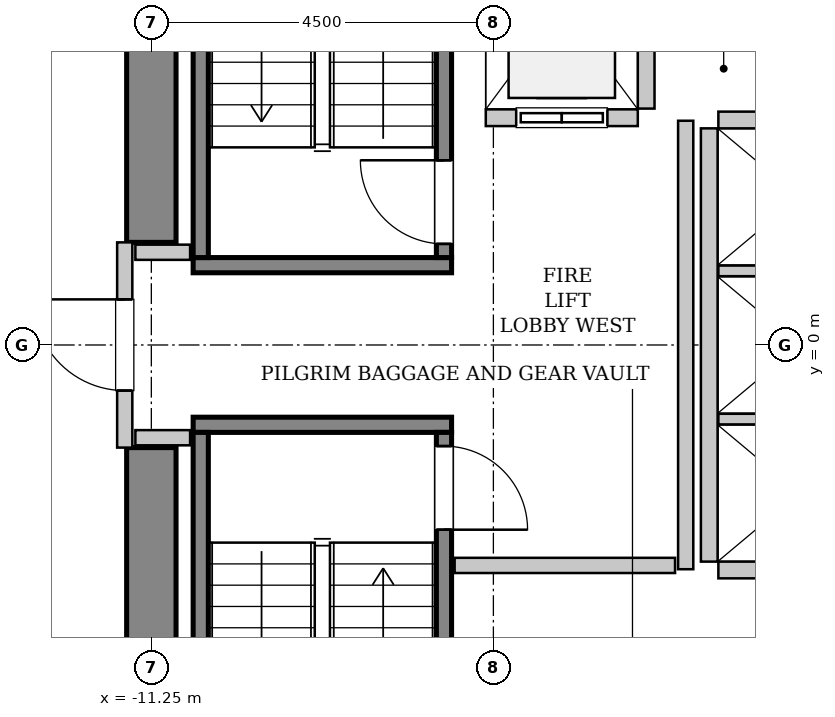
"""IFC4 building model, lengths in metres.
Left out: names, types, materials, properties, quantities, classifications, styles, units other than length and angle.
Written with IfcOpenShell. Run it as: python <this file> out.ifc"""

import sys

from ifc_helpers import new_model, si_unit, direction, frame, frame_2d, origin, place, context, subcontext, project, spatial, rectangle, extrude, source, transform, mapped, element, fill, save


model = new_model("IFC4")
c1 = context("Model", 3, precision=1e-05, world=origin(), true_north=direction((0.0, 1.0)))
c2 = subcontext(c1, "Body", "Model", "MODEL_VIEW")
j1 = project(units=[si_unit("LENGTHUNIT", "METRE"), si_unit("PLANEANGLEUNIT", "RADIAN")], contexts=[c1])
p1 = place(None, origin())
s1 = spatial("IfcSite", under=j1, at=p1, CompositionType="ELEMENT")
p2 = place(p1, origin())
s2 = spatial("IfcBuilding", under=s1, at=p2, CompositionType="ELEMENT")
p3 = place(p2, frame((0.0, 0.0, 78.6)))
s3 = spatial("IfcBuildingStorey", under=s2, at=p3, CompositionType="ELEMENT", Elevation=78.6)
m1 = source(origin(), c2, "Body", "SweptSolid", [
    extrude(rectangle(XDim=7.325, YDim=0.65, at=frame_2d((3.663, 0.0))), origin(), (0.0, 0.0, 1.0), 3.8),
])
for number, where, z_axis, x_axis in (
    (1, (-11.25, -8.675, 0.0), (0.0, 0.0, 1.0), (0.0, 1.0, 0.0)),
    (2, (-11.25, 1.35, 0.0), (0.0, 0.0, 1.0), (0.0, 1.0, 0.0)),
):
    element("IfcWall", number, at=place(p3, frame(where, z_axis=z_axis, x_axis=x_axis)), inside=s3, PredefinedType="SHEAR", context=c2, shape_type="MappedRepresentation", body=[
        mapped(m1, transform((0.0, 0.0, 0.0), x_axis=(1.0, 0.0, 0.0), y_axis=(0.0, 1.0, 0.0), z_axis=(0.0, 0.0, 1.0), scale=1.0)),
    ])
m2 = source(origin(), c2, "Body", "SweptSolid", [
    extrude(rectangle(XDim=3.4, YDim=0.2, at=frame_2d((1.7, 0.0))), origin(), (0.0, 0.0, 1.0), 3.8),
])
p4 = place(p3, frame((-7.3, 1.05, 0.0), z_axis=(0.0, 0.0, 1.0), x_axis=(-1.0, 0.0, 0.0)))
e3 = element("IfcWall", 3, at=p4, inside=s3, PredefinedType="SOLIDWALL", context=c2, shape_type="MappedRepresentation", body=[
    mapped(m2, transform((0.0, 0.0, 0.0), x_axis=(1.0, 0.0, 0.0), y_axis=(0.0, 1.0, 0.0), z_axis=(0.0, 0.0, 1.0), scale=1.0)),
])
m3 = source(origin(), c2, "Body", "SweptSolid", [
    extrude(rectangle(XDim=7.1, YDim=0.2, at=frame_2d((3.55, 0.0))), origin(), (0.0, 0.0, 1.0), 3.8),
])
p5 = place(p3, frame((-7.4, 1.15, 0.0), z_axis=(0.0, 0.0, 1.0), x_axis=(0.0, 1.0, 0.0)))
e4 = element("IfcWall", 4, at=p5, inside=s3, PredefinedType="SOLIDWALL", context=c2, shape_type="MappedRepresentation", body=[
    mapped(m3, transform((0.0, 0.0, 0.0), x_axis=(1.0, 0.0, 0.0), y_axis=(0.0, 1.0, 0.0), z_axis=(0.0, 0.0, 1.0), scale=1.0)),
])
p6 = place(p5, frame((0.18, 0.0, 0.0)))
e5 = element("IfcOpeningElement", 5, at=p6, cuts=e4, PredefinedType="OPENING", context=c2, shape_type="SweptSolid", body=[
    extrude(rectangle(XDim=1.1, YDim=2.15, at=frame_2d((0.55, 1.075))), frame((0.0, 0.11, 0.0), z_axis=(0.0, -1.0, 0.0), x_axis=(1.0, 0.0, 0.0)), (0.0, 0.0, 1.0), 0.22),
])
p7 = place(p3, frame((-10.6, 1.15, 0.0), z_axis=(0.0, 0.0, 1.0), x_axis=(0.0, 1.0, 0.0)))
e6 = element("IfcWall", 6, at=p7, inside=s3, PredefinedType="SOLIDWALL", context=c2, shape_type="MappedRepresentation", body=[
    mapped(m3, transform((0.0, 0.0, 0.0), x_axis=(1.0, 0.0, 0.0), y_axis=(0.0, 1.0, 0.0), z_axis=(0.0, 0.0, 1.0), scale=1.0)),
])
p8 = place(p3, frame((-10.7, -1.05, 0.0), z_axis=(0.0, 0.0, 1.0), x_axis=(1.0, 0.0, 0.0)))
e7 = element("IfcWall", 7, at=p8, inside=s3, PredefinedType="SOLIDWALL", context=c2, shape_type="MappedRepresentation", body=[
    mapped(m2, transform((0.0, 0.0, 0.0), x_axis=(1.0, 0.0, 0.0), y_axis=(0.0, 1.0, 0.0), z_axis=(0.0, 0.0, 1.0), scale=1.0)),
])
p9 = place(p3, frame((-10.6, -1.15, 0.0), z_axis=(0.0, 0.0, 1.0), x_axis=(0.0, -1.0, 0.0)))
e8 = element("IfcWall", 8, at=p9, inside=s3, PredefinedType="SOLIDWALL", context=c2, shape_type="MappedRepresentation", body=[
    mapped(m3, transform((0.0, 0.0, 0.0), x_axis=(1.0, 0.0, 0.0), y_axis=(0.0, 1.0, 0.0), z_axis=(0.0, 0.0, 1.0), scale=1.0)),
])
p10 = place(p3, frame((-7.4, -1.15, 0.0), z_axis=(0.0, 0.0, 1.0), x_axis=(0.0, -1.0, 0.0)))
e9 = element("IfcWall", 9, at=p10, inside=s3, PredefinedType="SOLIDWALL", context=c2, shape_type="MappedRepresentation", body=[
    mapped(m3, transform((0.0, 0.0, 0.0), x_axis=(1.0, 0.0, 0.0), y_axis=(0.0, 1.0, 0.0), z_axis=(0.0, 0.0, 1.0), scale=1.0)),
])
p11 = place(p10, frame((0.18, 0.0, 0.0)))
e10 = element("IfcOpeningElement", 10, at=p11, cuts=e9, PredefinedType="OPENING", context=c2, shape_type="SweptSolid", body=[
    extrude(rectangle(XDim=1.1, YDim=2.15, at=frame_2d((0.55, 1.075))), frame((0.0, 0.11, 0.0), z_axis=(0.0, -1.0, 0.0), x_axis=(1.0, 0.0, 0.0)), (0.0, 0.0, 1.0), 0.22),
])
m4 = source(origin(), c2, "Body", "SweptSolid", [
    extrude(rectangle(XDim=2.0, YDim=0.22, at=frame_2d((1.0, 0.0))), origin(), (0.0, 0.0, 1.0), 3.535),
])
p12 = place(p3, frame((-6.85, 2.99, 0.0), z_axis=(0.0, 0.0, 1.0), x_axis=(1.0, 0.0, 0.0)))
e11 = element("IfcWall", 11, at=p12, inside=s3, PredefinedType="SOLIDWALL", context=c2, shape_type="MappedRepresentation", body=[
    mapped(m4, transform((0.0, 0.0, 0.0), x_axis=(1.0, 0.0, 0.0), y_axis=(0.0, 1.0, 0.0), z_axis=(0.0, 0.0, 1.0), scale=1.0)),
])
p13 = place(p12, frame((0.4, 0.0, 0.0)))
e12 = element("IfcOpeningElement", 12, at=p13, cuts=e11, PredefinedType="OPENING", context=c2, shape_type="SweptSolid", body=[
    extrude(rectangle(XDim=1.2, YDim=2.2, at=frame_2d((0.6, 1.1))), frame((0.0, 0.12, 0.0), z_axis=(0.0, -1.0, 0.0), x_axis=(1.0, 0.0, 0.0)), (0.0, 0.0, 1.0), 0.24),
])
m5 = source(origin(), c2, "Body", "SweptSolid", [
    extrude(rectangle(XDim=2.68, YDim=0.22, at=frame_2d((1.34, 0.0))), origin(), (0.0, 0.0, 1.0), 3.535),
])
p14 = place(p3, frame((-4.74, 3.11, 0.0), z_axis=(0.0, 0.0, 1.0), x_axis=(0.0, 1.0, 0.0)))
e13 = element("IfcWall", 13, at=p14, inside=s3, PredefinedType="SOLIDWALL", context=c2, shape_type="MappedRepresentation", body=[
    mapped(m5, transform((0.0, 0.0, 0.0), x_axis=(1.0, 0.0, 0.0), y_axis=(0.0, 1.0, 0.0), z_axis=(0.0, 0.0, 1.0), scale=1.0)),
])
m6 = source(origin(), c2, "Body", "SweptSolid", [
    extrude(rectangle(XDim=5.7, YDim=0.22, at=frame_2d((2.85, 0.0))), origin(), (0.0, 0.0, 1.0), 3.535),
])
p15 = place(p3, frame((-3.91, 2.85, 0.0), z_axis=(0.0, 0.0, 1.0), x_axis=(0.0, -1.0, 0.0)))
e14 = element("IfcWall", 14, at=p15, inside=s3, PredefinedType="SOLIDWALL", context=c2, shape_type="MappedRepresentation", body=[
    mapped(m6, transform((0.0, 0.0, 0.0), x_axis=(1.0, 0.0, 0.0), y_axis=(0.0, 1.0, 0.0), z_axis=(0.0, 0.0, 1.0), scale=1.0)),
])
m7 = source(origin(), c2, "Body", "SweptSolid", [
    extrude(rectangle(XDim=2.13, YDim=0.22, at=frame_2d((1.065, 0.0))), origin(), (0.0, 0.0, 1.0), 3.535),
])
p16 = place(p3, frame((-3.79, -2.96, 0.0), z_axis=(0.0, 0.0, 1.0), x_axis=(1.0, 0.0, 0.0)))
e15 = element("IfcWall", 15, at=p16, inside=s3, PredefinedType="SOLIDWALL", context=c2, shape_type="MappedRepresentation", body=[
    mapped(m7, transform((0.0, 0.0, 0.0), x_axis=(1.0, 0.0, 0.0), y_axis=(0.0, 1.0, 0.0), z_axis=(0.0, 0.0, 1.0), scale=1.0)),
])
m8 = source(origin(), c2, "Body", "SweptSolid", [
    extrude(rectangle(XDim=2.13, YDim=0.14, at=frame_2d((1.065, 0.0))), origin(), (0.0, 0.0, 1.0), 3.535),
])
for number, where, z_axis, x_axis in (
    (16, (-3.79, -0.975, 0.0), (0.0, 0.0, 1.0), (1.0, 0.0, 0.0)),
    (17, (-3.79, 0.975, 0.0), (0.0, 0.0, 1.0), (1.0, 0.0, 0.0)),
):
    element("IfcWall", number, at=place(p3, frame(where, z_axis=z_axis, x_axis=x_axis)), inside=s3, PredefinedType="PARTITIONING", context=c2, shape_type="MappedRepresentation", body=[
        mapped(m8, transform((0.0, 0.0, 0.0), x_axis=(1.0, 0.0, 0.0), y_axis=(0.0, 1.0, 0.0), z_axis=(0.0, 0.0, 1.0), scale=1.0)),
    ])
p17 = place(p3, frame((-1.66, 2.96, 0.0), z_axis=(0.0, 0.0, 1.0), x_axis=(-1.0, 0.0, 0.0)))
e18 = element("IfcWall", 18, at=p17, inside=s3, PredefinedType="SOLIDWALL", context=c2, shape_type="MappedRepresentation", body=[
    mapped(m7, transform((0.0, 0.0, 0.0), x_axis=(1.0, 0.0, 0.0), y_axis=(0.0, 1.0, 0.0), z_axis=(0.0, 0.0, 1.0), scale=1.0)),
])
m9 = source(origin(), c2, "Body", "SweptSolid", [
    extrude(rectangle(XDim=2.7, YDim=0.2, at=frame_2d((1.35, 0.0))), origin(), (0.0, 0.0, 1.0), 2.425),
])
p18 = place(p3, frame((-11.6, -1.35, 0.0), z_axis=(0.0, 0.0, 1.0), x_axis=(0.0, 1.0, 0.0)))
e19 = element("IfcWall", 19, at=p18, inside=s3, PredefinedType="PARTITIONING", context=c2, shape_type="MappedRepresentation", body=[
    mapped(m9, transform((0.0, 0.0, 0.0), x_axis=(1.0, 0.0, 0.0), y_axis=(0.0, 1.0, 0.0), z_axis=(0.0, 0.0, 1.0), scale=1.0)),
])
p19 = place(p18, frame((0.75, 0.0, 0.0)))
e20 = element("IfcOpeningElement", 20, at=p19, cuts=e19, PredefinedType="OPENING", context=c2, shape_type="SweptSolid", body=[
    extrude(rectangle(XDim=1.2, YDim=2.15, at=frame_2d((0.6, 1.075))), frame((0.0, 0.11, 0.0), z_axis=(0.0, -1.0, 0.0), x_axis=(1.0, 0.0, 0.0)), (0.0, 0.0, 1.0), 0.22),
])
m10 = source(origin(), c2, "Body", "SweptSolid", [
    extrude(rectangle(XDim=5.9, YDim=0.2, at=frame_2d((2.95, 0.0))), origin(), (0.0, 0.0, 1.0), 3.535),
])
p20 = place(p3, frame((-4.22, -2.95, 0.0), z_axis=(0.0, 0.0, 1.0), x_axis=(0.0, 1.0, 0.0)))
e21 = element("IfcWall", 21, at=p20, inside=s3, PredefinedType="PARTITIONING", context=c2, shape_type="MappedRepresentation", body=[
    mapped(m10, transform((0.0, 0.0, 0.0), x_axis=(1.0, 0.0, 0.0), y_axis=(0.0, 1.0, 0.0), z_axis=(0.0, 0.0, 1.0), scale=1.0)),
])
m11 = source(origin(), c2, "Body", "SweptSolid", [
    extrude(rectangle(XDim=2.9, YDim=0.2, at=frame_2d((1.45, 0.0))), origin(), (0.0, 0.0, 1.0), 3.535),
])
p21 = place(p3, frame((-7.26, -2.9, 0.0), z_axis=(0.0, 0.0, 1.0), x_axis=(1.0, 0.0, 0.0)))
e22 = element("IfcWall", 22, at=p21, inside=s3, PredefinedType="PARTITIONING", context=c2, shape_type="MappedRepresentation", body=[
    mapped(m11, transform((0.0, 0.0, 0.0), x_axis=(1.0, 0.0, 0.0), y_axis=(0.0, 1.0, 0.0), z_axis=(0.0, 0.0, 1.0), scale=1.0)),
])
m12 = source(origin(), c2, "Body", "SweptSolid", [
    extrude(rectangle(XDim=0.72, YDim=0.2, at=frame_2d((0.36, 0.0))), origin(), (0.0, 0.0, 1.0), 3.535),
])
for number, where, z_axis, x_axis in (
    (23, (-11.46, 1.22, 0.0), (0.0, 0.0, 1.0), (1.0, 0.0, 0.0)),
    (24, (-11.46, -1.22, 0.0), (0.0, 0.0, 1.0), (1.0, 0.0, 0.0)),
):
    element("IfcWall", number, at=place(p3, frame(where, z_axis=z_axis, x_axis=x_axis)), inside=s3, PredefinedType="PARTITIONING", context=c2, shape_type="MappedRepresentation", body=[
        mapped(m12, transform((0.0, 0.0, 0.0), x_axis=(1.0, 0.0, 0.0), y_axis=(0.0, 1.0, 0.0), z_axis=(0.0, 0.0, 1.0), scale=1.0)),
    ])
m13 = source(origin(), c2, "Body", "SweptSolid", [
    extrude(rectangle(XDim=1.1, YDim=2.15, at=frame_2d((0.55, 1.075))), frame((0.0, 0.025, 0.0), z_axis=(0.0, -1.0, 0.0), x_axis=(1.0, 0.0, 0.0)), (0.0, 0.0, 1.0), 0.05),
])
p22 = place(p6, origin())
e25 = element("IfcDoor", 25, at=p22, inside=s3, OperationType="SINGLE_SWING_RIGHT", PredefinedType="DOOR", context=c2, shape_type="MappedRepresentation", body=[
    mapped(m13, transform((0.0, 0.0, 0.0), x_axis=(1.0, 0.0, 0.0), y_axis=(0.0, 1.0, 0.0), z_axis=(0.0, 0.0, 1.0), scale=1.0)),
])
fill(e5, e25)
p23 = place(p11, origin())
e26 = element("IfcDoor", 26, at=p23, inside=s3, OperationType="SINGLE_SWING_RIGHT", PredefinedType="DOOR", context=c2, shape_type="MappedRepresentation", body=[
    mapped(m13, transform((0.0, 0.0, 0.0), x_axis=(1.0, 0.0, 0.0), y_axis=(0.0, 1.0, 0.0), z_axis=(0.0, 0.0, 1.0), scale=1.0)),
])
fill(e10, e26)
m14 = source(origin(), c2, "Body", "SweptSolid", [
    extrude(rectangle(XDim=1.2, YDim=2.2, at=frame_2d((0.6, 1.1))), frame((0.0, 0.025, 0.0), z_axis=(0.0, -1.0, 0.0), x_axis=(1.0, 0.0, 0.0)), (0.0, 0.0, 1.0), 0.05),
])
p24 = place(p13, origin())
e27 = element("IfcDoor", 27, at=p24, inside=s3, OperationType="SLIDING_TO_LEFT", PredefinedType="DOOR", context=c2, shape_type="MappedRepresentation", body=[
    mapped(m14, transform((0.0, 0.0, 0.0), x_axis=(1.0, 0.0, 0.0), y_axis=(0.0, 1.0, 0.0), z_axis=(0.0, 0.0, 1.0), scale=1.0)),
])
fill(e12, e27)
m15 = source(origin(), c2, "Body", "SweptSolid", [
    extrude(rectangle(XDim=1.2, YDim=2.15, at=frame_2d((0.6, 1.075))), frame((0.0, 0.025, 0.0), z_axis=(0.0, -1.0, 0.0), x_axis=(1.0, 0.0, 0.0)), (0.0, 0.0, 1.0), 0.05),
])
p25 = place(p19, origin())
e28 = element("IfcDoor", 28, at=p25, inside=s3, OperationType="SINGLE_SWING_RIGHT", PredefinedType="DOOR", context=c2, shape_type="MappedRepresentation", body=[
    mapped(m15, transform((0.0, 0.0, 0.0), x_axis=(1.0, 0.0, 0.0), y_axis=(0.0, 1.0, 0.0), z_axis=(0.0, 0.0, 1.0), scale=1.0)),
])
fill(e20, e28)
save(model, sys.argv[1])
